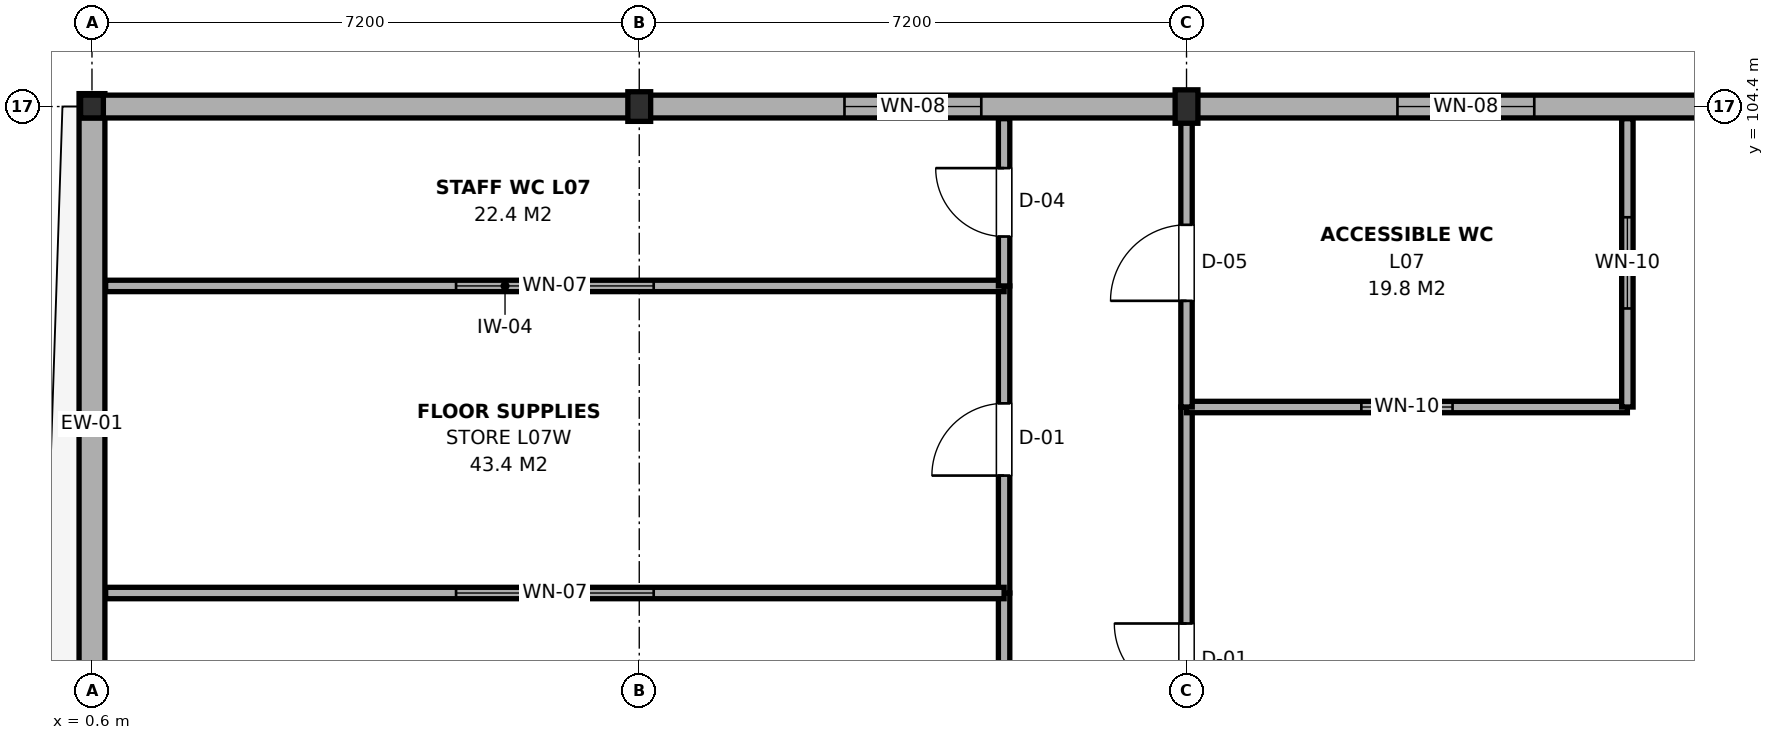
"""IFC4 building model, lengths in metres.
Left out: names, types, materials, properties, quantities, classifications, styles, units other than length and angle.
Written with IfcOpenShell. Run it as: python <this file> out.ifc"""

import sys

from ifc_helpers import new_model, si_unit, direction, frame, frame_2d, origin, origin_2d, place, context, subcontext, project, spatial, rectangle, i_section, extrude, element, fill, save


model = new_model("IFC4")
c1 = context("Model", 3, precision=1e-05, world=origin(), true_north=direction((0.0, 1.0)))
c2 = subcontext(c1, "Body", "Model", "MODEL_VIEW")
j1 = project(units=[si_unit("LENGTHUNIT", "METRE"), si_unit("PLANEANGLEUNIT", "RADIAN")], contexts=[c1])
p1 = place(None, origin())
s1 = spatial("IfcSite", under=j1, at=p1, CompositionType="ELEMENT")
p2 = place(p1, origin())
s2 = spatial("IfcBuilding", under=s1, at=p2, CompositionType="ELEMENT")
p3 = place(p2, frame((0.0, 0.0, 28.8)))
s3 = spatial("IfcBuildingStorey", under=s2, at=p3, CompositionType="ELEMENT", Elevation=28.8)
p4 = place(p3, frame((0.6, 104.4, 0.0), z_axis=(0.0, 0.0, 1.0), x_axis=(1.0, 0.0, 0.0)))
e1 = element("IfcColumn", 1, at=p4, inside=s3, PredefinedType="COLUMN", context=c2, shape_type="SweptSolid", body=[
    extrude(i_section(OverallWidth=0.3, OverallDepth=0.3, WebThickness=0.011, FlangeThickness=0.019, FilletRadius=0.027, at=origin_2d()), origin(), (0.0, 0.0, 1.0), 3.9),
])
p5 = place(p3, frame((7.8, 104.4, 0.0), z_axis=(0.0, 0.0, 1.0), x_axis=(1.0, 0.0, 0.0)))
e2 = element("IfcColumn", 2, at=p5, inside=s3, PredefinedType="COLUMN", context=c2, shape_type="SweptSolid", body=[
    extrude(i_section(OverallWidth=0.3, OverallDepth=0.39, WebThickness=0.011, FlangeThickness=0.019, FilletRadius=0.027, at=origin_2d()), origin(), (0.0, 0.0, 1.0), 3.9),
])
p6 = place(p3, frame((15.0, 104.4, 0.0), z_axis=(0.0, 0.0, 1.0), x_axis=(1.0, 0.0, 0.0)))
e3 = element("IfcColumn", 3, at=p6, inside=s3, PredefinedType="COLUMN", context=c2, shape_type="SweptSolid", body=[
    extrude(i_section(OverallWidth=0.3, OverallDepth=0.44, WebThickness=0.011, FlangeThickness=0.021, FilletRadius=0.027, at=origin_2d()), origin(), (0.0, 0.0, 1.0), 3.9),
])
p7 = place(p3, frame((0.6, 96.0, 0.0), z_axis=(0.0, 0.0, 1.0), x_axis=(0.0, 1.0, 0.0)))
e4 = element("IfcWall", 4, at=p7, inside=s3, PredefinedType="SOLIDWALL", context=c2, shape_type="SweptSolid", body=[
    extrude(rectangle(XDim=8.57, YDim=0.34, at=frame_2d((4.285, 0.0))), origin(), (0.0, 0.0, 1.0), 3.215),
])
p8 = place(p3, frame((0.45, 104.4, 0.0), z_axis=(0.0, 0.0, 1.0), x_axis=(1.0, 0.0, 0.0)))
e5 = element("IfcWall", 5, at=p8, inside=s3, PredefinedType="SOLIDWALL", context=c2, shape_type="SweptSolid", body=[
    extrude(rectangle(XDim=7.35, YDim=0.3, at=frame_2d((3.675, 0.0))), origin(), (0.0, 0.0, 1.0), 3.115),
])
p9 = place(p3, frame((7.8, 104.4, 0.0), z_axis=(0.0, 0.0, 1.0), x_axis=(1.0, 0.0, 0.0)))
e6 = element("IfcWall", 6, at=p9, inside=s3, PredefinedType="SOLIDWALL", context=c2, shape_type="SweptSolid", body=[
    extrude(rectangle(XDim=7.2, YDim=0.3, at=frame_2d((3.6, 0.0))), origin(), (0.0, 0.0, 1.0), 3.115),
])
p10 = place(p9, frame((2.7, 0.0, 0.65)))
e7 = element("IfcOpeningElement", 7, at=p10, cuts=e6, PredefinedType="OPENING", context=c2, shape_type="SweptSolid", body=[
    extrude(rectangle(XDim=1.8, YDim=1.2, at=frame_2d((0.9, 0.6))), frame((0.0, 0.165, 0.0), z_axis=(0.0, -1.0, 0.0), x_axis=(1.0, 0.0, 0.0)), (0.0, 0.0, 1.0), 0.33),
])
p11 = place(p3, frame((15.0, 104.4, 0.0), z_axis=(0.0, 0.0, 1.0), x_axis=(1.0, 0.0, 0.0)))
e8 = element("IfcWall", 8, at=p11, inside=s3, PredefinedType="SOLIDWALL", context=c2, shape_type="SweptSolid", body=[
    extrude(rectangle(XDim=7.35, YDim=0.3, at=frame_2d((3.675, 0.0))), origin(), (0.0, 0.0, 1.0), 3.165),
])
p12 = place(p11, frame((2.775, 0.0, 0.65)))
e9 = element("IfcOpeningElement", 9, at=p12, cuts=e8, PredefinedType="OPENING", context=c2, shape_type="SweptSolid", body=[
    extrude(rectangle(XDim=1.8, YDim=1.2, at=frame_2d((0.9, 0.6))), frame((0.0, 0.165, 0.0), z_axis=(0.0, -1.0, 0.0), x_axis=(1.0, 0.0, 0.0)), (0.0, 0.0, 1.0), 0.33),
])
p13 = place(p3, frame((12.6, 88.4, 0.0), z_axis=(0.0, 0.0, 1.0), x_axis=(0.0, 1.0, 0.0)))
e10 = element("IfcWall", 10, at=p13, inside=s3, PredefinedType="PARTITIONING", context=c2, shape_type="SweptSolid", body=[
    extrude(rectangle(XDim=9.6, YDim=0.15, at=frame_2d((4.8, 0.0))), origin(), (0.0, 0.0, 1.0), 3.165),
])
p14 = place(p13, frame((4.275, 0.0, 0.0)))
e11 = element("IfcOpeningElement", 11, at=p14, cuts=e10, PredefinedType="OPENING", context=c2, shape_type="SweptSolid", body=[
    extrude(rectangle(XDim=1.05, YDim=2.15, at=frame_2d((0.525, 1.075))), frame((0.0, 0.09, 0.0), z_axis=(0.0, -1.0, 0.0), x_axis=(1.0, 0.0, 0.0)), (0.0, 0.0, 1.0), 0.18),
])
p15 = place(p3, frame((12.6, 98.0, 0.0), z_axis=(0.0, 0.0, 1.0), x_axis=(0.0, 1.0, 0.0)))
e12 = element("IfcWall", 12, at=p15, inside=s3, PredefinedType="PARTITIONING", context=c2, shape_type="SweptSolid", body=[
    extrude(rectangle(XDim=4.04, YDim=0.15, at=frame_2d((2.02, 0.0))), origin(), (0.0, 0.0, 1.0), 3.415),
])
p16 = place(p15, frame((1.545, 0.0, 0.0)))
e13 = element("IfcOpeningElement", 13, at=p16, cuts=e12, PredefinedType="OPENING", context=c2, shape_type="SweptSolid", body=[
    extrude(rectangle(XDim=0.95, YDim=2.15, at=frame_2d((0.475, 1.075))), frame((0.0, 0.09, 0.0), z_axis=(0.0, -1.0, 0.0), x_axis=(1.0, 0.0, 0.0)), (0.0, 0.0, 1.0), 0.18),
])
p17 = place(p3, frame((0.78, 102.04, 0.0), z_axis=(0.0, 0.0, 1.0), x_axis=(1.0, 0.0, 0.0)))
e14 = element("IfcWall", 14, at=p17, inside=s3, PredefinedType="PARTITIONING", context=c2, shape_type="SweptSolid", body=[
    extrude(rectangle(XDim=11.82, YDim=0.15, at=frame_2d((5.91, 0.0))), origin(), (0.0, 0.0, 1.0), 3.125),
])
p18 = place(p17, frame((4.61, 0.0, 0.95)))
e15 = element("IfcOpeningElement", 15, at=p18, cuts=e14, PredefinedType="OPENING", context=c2, shape_type="SweptSolid", body=[
    extrude(rectangle(XDim=2.6, YDim=1.5, at=frame_2d((1.3, 0.75))), frame((0.0, 0.09, 0.0), z_axis=(0.0, -1.0, 0.0), x_axis=(1.0, 0.0, 0.0)), (0.0, 0.0, 1.0), 0.18),
])
p19 = place(p3, frame((12.6, 102.04, 0.0), z_axis=(0.0, 0.0, 1.0), x_axis=(0.0, 1.0, 0.0)))
e16 = element("IfcWall", 16, at=p19, inside=s3, PredefinedType="PARTITIONING", context=c2, shape_type="SweptSolid", body=[
    extrude(rectangle(XDim=2.2, YDim=0.15, at=frame_2d((1.1, 0.0))), origin(), (0.0, 0.0, 1.0), 3.165),
])
p20 = place(p19, frame((0.65, 0.0, 0.0)))
e17 = element("IfcOpeningElement", 17, at=p20, cuts=e16, PredefinedType="OPENING", context=c2, shape_type="SweptSolid", body=[
    extrude(rectangle(XDim=0.9, YDim=2.15, at=frame_2d((0.45, 1.075))), frame((0.0, 0.09, 0.0), z_axis=(0.0, -1.0, 0.0), x_axis=(1.0, 0.0, 0.0)), (0.0, 0.0, 1.0), 0.18),
])
p21 = place(p3, frame((0.78, 98.0, 0.0), z_axis=(0.0, 0.0, 1.0), x_axis=(1.0, 0.0, 0.0)))
e18 = element("IfcWall", 18, at=p21, inside=s3, PredefinedType="PARTITIONING", context=c2, shape_type="SweptSolid", body=[
    extrude(rectangle(XDim=11.82, YDim=0.15, at=frame_2d((5.91, 0.0))), origin(), (0.0, 0.0, 1.0), 3.125),
])
p22 = place(p21, frame((4.61, 0.0, 0.95)))
e19 = element("IfcOpeningElement", 19, at=p22, cuts=e18, PredefinedType="OPENING", context=c2, shape_type="SweptSolid", body=[
    extrude(rectangle(XDim=2.6, YDim=1.5, at=frame_2d((1.3, 0.75))), frame((0.0, 0.09, 0.0), z_axis=(0.0, -1.0, 0.0), x_axis=(1.0, 0.0, 0.0)), (0.0, 0.0, 1.0), 0.18),
])
p23 = place(p3, frame((15.0, 92.0, 0.0), z_axis=(0.0, 0.0, 1.0), x_axis=(0.0, 1.0, 0.0)))
e20 = element("IfcWall", 20, at=p23, inside=s3, PredefinedType="PARTITIONING", context=c2, shape_type="SweptSolid", body=[
    extrude(rectangle(XDim=8.447, YDim=0.15, at=frame_2d((4.224, 0.0))), origin(), (0.0, 0.0, 1.0), 3.175),
])
p24 = place(p23, frame((4.649, 0.0, 0.0)))
e21 = element("IfcOpeningElement", 21, at=p24, cuts=e20, PredefinedType="OPENING", context=c2, shape_type="SweptSolid", body=[
    extrude(rectangle(XDim=0.95, YDim=2.15, at=frame_2d((0.475, 1.075))), frame((0.0, 0.09, 0.0), z_axis=(0.0, -1.0, 0.0), x_axis=(1.0, 0.0, 0.0)), (0.0, 0.0, 1.0), 0.18),
])
p25 = place(p3, frame((15.0, 100.447, 0.0), z_axis=(0.0, 0.0, 1.0), x_axis=(1.0, 0.0, 0.0)))
e22 = element("IfcWall", 22, at=p25, inside=s3, PredefinedType="PARTITIONING", context=c2, shape_type="SweptSolid", body=[
    extrude(rectangle(XDim=5.8, YDim=0.15, at=frame_2d((2.9, 0.0))), origin(), (0.0, 0.0, 1.0), 3.175),
])
p26 = place(p25, frame((2.3, 0.0, 0.95)))
e23 = element("IfcOpeningElement", 23, at=p26, cuts=e22, PredefinedType="OPENING", context=c2, shape_type="SweptSolid", body=[
    extrude(rectangle(XDim=1.2, YDim=1.5, at=frame_2d((0.6, 0.75))), frame((0.0, 0.09, 0.0), z_axis=(0.0, -1.0, 0.0), x_axis=(1.0, 0.0, 0.0)), (0.0, 0.0, 1.0), 0.18),
])
p27 = place(p3, frame((20.8, 100.447, 0.0), z_axis=(0.0, 0.0, 1.0), x_axis=(0.0, 1.0, 0.0)))
e24 = element("IfcWall", 24, at=p27, inside=s3, PredefinedType="PARTITIONING", context=c2, shape_type="SweptSolid", body=[
    extrude(rectangle(XDim=3.793, YDim=0.15, at=frame_2d((1.896, 0.0))), origin(), (0.0, 0.0, 1.0), 3.215),
])
p28 = place(p27, frame((1.296, 0.0, 0.95)))
e25 = element("IfcOpeningElement", 25, at=p28, cuts=e24, PredefinedType="OPENING", context=c2, shape_type="SweptSolid", body=[
    extrude(rectangle(XDim=1.2, YDim=1.5, at=frame_2d((0.6, 0.75))), frame((0.0, 0.09, 0.0), z_axis=(0.0, -1.0, 0.0), x_axis=(1.0, 0.0, 0.0)), (0.0, 0.0, 1.0), 0.18),
])
p29 = place(p3, frame((15.0, 100.447, 0.0), z_axis=(0.0, 0.0, 1.0), x_axis=(0.0, 1.0, 0.0)))
e26 = element("IfcWall", 26, at=p29, inside=s3, PredefinedType="PARTITIONING", context=c2, shape_type="SweptSolid", body=[
    extrude(rectangle(XDim=3.793, YDim=0.15, at=frame_2d((1.896, 0.0))), origin(), (0.0, 0.0, 1.0), 3.165),
])
p30 = place(p29, frame((1.397, 0.0, 0.0)))
e27 = element("IfcOpeningElement", 27, at=p30, cuts=e26, PredefinedType="OPENING", context=c2, shape_type="SweptSolid", body=[
    extrude(rectangle(XDim=1.0, YDim=2.15, at=frame_2d((0.5, 1.075))), frame((0.0, 0.09, 0.0), z_axis=(0.0, -1.0, 0.0), x_axis=(1.0, 0.0, 0.0)), (0.0, 0.0, 1.0), 0.18),
])
p31 = place(p10, origin())
e28 = element("IfcWindow", 28, at=p31, inside=s3, PartitioningType="SINGLE_PANEL", PredefinedType="WINDOW", context=c2, shape_type="SweptSolid", body=[
    extrude(rectangle(XDim=1.8, YDim=1.2, at=frame_2d((0.9, 0.6))), frame((0.0, 0.03, 0.0), z_axis=(0.0, -1.0, 0.0), x_axis=(1.0, 0.0, 0.0)), (0.0, 0.0, 1.0), 0.06),
])
fill(e7, e28)
p32 = place(p12, origin())
e29 = element("IfcWindow", 29, at=p32, inside=s3, PartitioningType="SINGLE_PANEL", PredefinedType="WINDOW", context=c2, shape_type="SweptSolid", body=[
    extrude(rectangle(XDim=1.8, YDim=1.2, at=frame_2d((0.9, 0.6))), frame((0.0, 0.03, 0.0), z_axis=(0.0, -1.0, 0.0), x_axis=(1.0, 0.0, 0.0)), (0.0, 0.0, 1.0), 0.06),
])
fill(e9, e29)
p33 = place(p16, origin())
e30 = element("IfcDoor", 30, at=p33, inside=s3, OperationType="SINGLE_SWING_LEFT", PredefinedType="DOOR", context=c2, shape_type="SweptSolid", body=[
    extrude(rectangle(XDim=0.95, YDim=2.15, at=frame_2d((0.475, 1.075))), frame((0.0, 0.025, 0.0), z_axis=(0.0, -1.0, 0.0), x_axis=(1.0, 0.0, 0.0)), (0.0, 0.0, 1.0), 0.05),
])
fill(e13, e30)
p34 = place(p18, origin())
e31 = element("IfcWindow", 31, at=p34, inside=s3, PartitioningType="SINGLE_PANEL", PredefinedType="WINDOW", context=c2, shape_type="SweptSolid", body=[
    extrude(rectangle(XDim=2.6, YDim=1.5, at=frame_2d((1.3, 0.75))), frame((0.0, 0.03, 0.0), z_axis=(0.0, -1.0, 0.0), x_axis=(1.0, 0.0, 0.0)), (0.0, 0.0, 1.0), 0.06),
])
fill(e15, e31)
p35 = place(p20, origin())
e32 = element("IfcDoor", 32, at=p35, inside=s3, OperationType="SINGLE_SWING_RIGHT", PredefinedType="DOOR", context=c2, shape_type="SweptSolid", body=[
    extrude(rectangle(XDim=0.9, YDim=2.15, at=frame_2d((0.45, 1.075))), frame((0.0, 0.025, 0.0), z_axis=(0.0, -1.0, 0.0), x_axis=(1.0, 0.0, 0.0)), (0.0, 0.0, 1.0), 0.05),
])
fill(e17, e32)
p36 = place(p22, origin())
e33 = element("IfcWindow", 33, at=p36, inside=s3, PartitioningType="SINGLE_PANEL", PredefinedType="WINDOW", context=c2, shape_type="SweptSolid", body=[
    extrude(rectangle(XDim=2.6, YDim=1.5, at=frame_2d((1.3, 0.75))), frame((0.0, 0.03, 0.0), z_axis=(0.0, -1.0, 0.0), x_axis=(1.0, 0.0, 0.0)), (0.0, 0.0, 1.0), 0.06),
])
fill(e19, e33)
p37 = place(p24, origin())
e34 = element("IfcDoor", 34, at=p37, inside=s3, OperationType="SINGLE_SWING_RIGHT", PredefinedType="DOOR", context=c2, shape_type="SweptSolid", body=[
    extrude(rectangle(XDim=0.95, YDim=2.15, at=frame_2d((0.475, 1.075))), frame((0.0, 0.025, 0.0), z_axis=(0.0, -1.0, 0.0), x_axis=(1.0, 0.0, 0.0)), (0.0, 0.0, 1.0), 0.05),
])
fill(e21, e34)
p38 = place(p26, origin())
e35 = element("IfcWindow", 35, at=p38, inside=s3, PartitioningType="SINGLE_PANEL", PredefinedType="WINDOW", context=c2, shape_type="SweptSolid", body=[
    extrude(rectangle(XDim=1.2, YDim=1.5, at=frame_2d((0.6, 0.75))), frame((0.0, 0.03, 0.0), z_axis=(0.0, -1.0, 0.0), x_axis=(1.0, 0.0, 0.0)), (0.0, 0.0, 1.0), 0.06),
])
fill(e23, e35)
p39 = place(p28, origin())
e36 = element("IfcWindow", 36, at=p39, inside=s3, PartitioningType="SINGLE_PANEL", PredefinedType="WINDOW", context=c2, shape_type="SweptSolid", body=[
    extrude(rectangle(XDim=1.2, YDim=1.5, at=frame_2d((0.6, 0.75))), frame((0.0, 0.03, 0.0), z_axis=(0.0, -1.0, 0.0), x_axis=(1.0, 0.0, 0.0)), (0.0, 0.0, 1.0), 0.06),
])
fill(e25, e36)
p40 = place(p30, origin())
e37 = element("IfcDoor", 37, at=p40, inside=s3, OperationType="SINGLE_SWING_LEFT", PredefinedType="DOOR", context=c2, shape_type="SweptSolid", body=[
    extrude(rectangle(XDim=1.0, YDim=2.15, at=frame_2d((0.5, 1.075))), frame((0.0, 0.025, 0.0), z_axis=(0.0, -1.0, 0.0), x_axis=(1.0, 0.0, 0.0)), (0.0, 0.0, 1.0), 0.05),
])
fill(e27, e37)
save(model, sys.argv[1])
